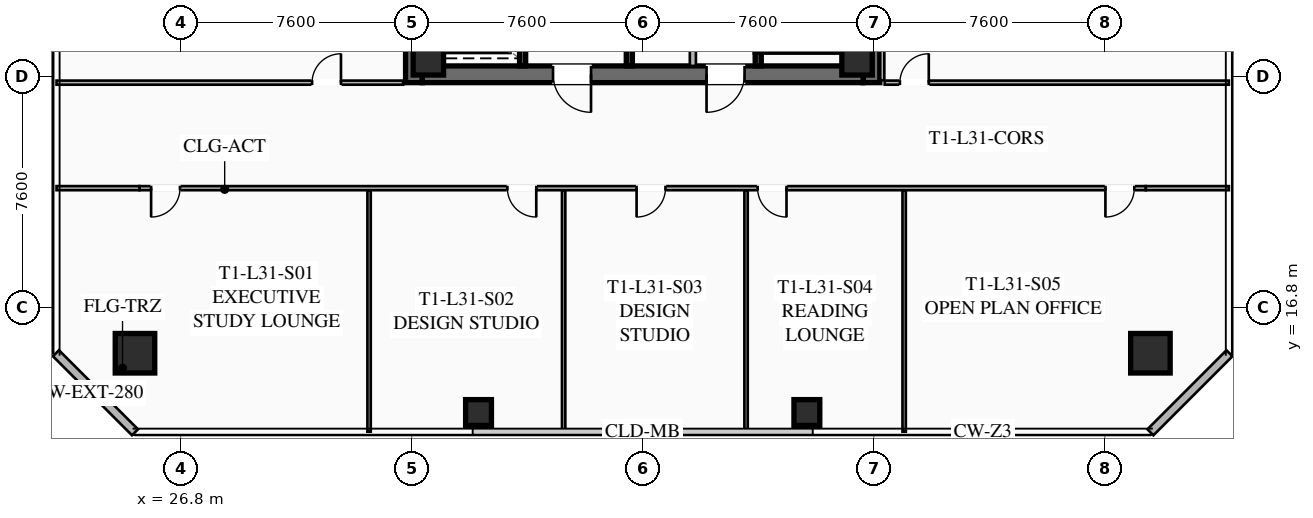
"""IFC4 building model, lengths in metres.
Left out: names, types, materials, properties, quantities, classifications, styles, units other than length and angle.
Written with IfcOpenShell. Run it as: python <this file> out.ifc"""

import sys

from ifc_helpers import new_model, si_unit, direction, frame, frame_2d, origin, origin_2d, place, context, subcontext, project, spatial, rectangle, hollow_rectangle, extrude, element, fill, save


model = new_model("IFC4")
c1 = context("Model", 3, precision=1e-05, world=origin(), true_north=direction((0.0, 1.0)))
c2 = subcontext(c1, "Body", "Model", "MODEL_VIEW")
j1 = project(units=[si_unit("LENGTHUNIT", "METRE"), si_unit("PLANEANGLEUNIT", "RADIAN")], contexts=[c1])
p1 = place(None, origin())
s1 = spatial("IfcSite", under=j1, at=p1, CompositionType="ELEMENT")
p2 = place(p1, origin())
s2 = spatial("IfcBuilding", under=s1, at=p2, CompositionType="ELEMENT")
p3 = place(p2, frame((0.0, 0.0, 117.95)))
s3 = spatial("IfcBuildingStorey", under=s2, at=p3, CompositionType="ELEMENT", Elevation=117.95)
for number, where, z_axis, x_axis in (
    (1, (34.475, 24.2, 0.0), (0.0, 0.0, 1.0), (0.0, 1.0, 0.0)),
    (2, (49.525, 39.8, 0.0), (0.0, 0.0, 1.0), (0.0, -1.0, 0.0)),
):
    element("IfcWall", number, at=place(p3, frame(where, z_axis=z_axis, x_axis=x_axis)), inside=s3, PredefinedType="SHEAR", context=c2, shape_type="SweptSolid", body=[
        extrude(rectangle(XDim=15.6, YDim=0.55, at=frame_2d((7.8, 0.0))), origin(), (0.0, 0.0, 1.0), 3.55),
    ])
p4 = place(p3, frame((49.25, 24.475, 0.0), z_axis=(0.0, 0.0, 1.0), x_axis=(-1.0, 0.0, 0.0)))
e3 = element("IfcWall", 3, at=p4, inside=s3, PredefinedType="SHEAR", context=c2, shape_type="SweptSolid", body=[
    extrude(rectangle(XDim=14.5, YDim=0.55, at=frame_2d((7.25, 0.0))), origin(), (0.0, 0.0, 1.0), 3.55),
])
p5 = place(p4, frame((8.95, 0.0, 0.0)))
e4 = element("IfcOpeningElement", 4, at=p5, cuts=e3, PredefinedType="OPENING", context=c2, shape_type="SweptSolid", body=[
    extrude(rectangle(XDim=1.25, YDim=2.25, at=frame_2d((0.625, 1.125))), frame((0.0, 0.285, 0.0), z_axis=(0.0, -1.0, 0.0), x_axis=(1.0, 0.0, 0.0)), (0.0, 0.0, 1.0), 0.57),
])
p6 = place(p4, frame((3.9, 0.0, 0.0)))
e5 = element("IfcOpeningElement", 5, at=p6, cuts=e3, PredefinedType="OPENING", context=c2, shape_type="SweptSolid", body=[
    extrude(rectangle(XDim=1.25, YDim=2.25, at=frame_2d((0.625, 1.125))), frame((0.0, 0.285, 0.0), z_axis=(0.0, -1.0, 0.0), x_axis=(1.0, 0.0, 0.0)), (0.0, 0.0, 1.0), 0.57),
])
for number, where, z_axis, x_axis in (
    (6, (34.95, 24.95, 0.0), (0.0, 0.0, 1.0), (1.0, 0.0, 0.0)),
    (7, (49.05, 24.95, 0.0), (0.0, 0.0, 1.0), (1.0, 0.0, 0.0)),
):
    element("IfcColumn", number, at=place(p3, frame(where, z_axis=z_axis, x_axis=x_axis)), inside=s3, PredefinedType="COLUMN", context=c2, shape_type="SweptSolid", body=[
        extrude(hollow_rectangle(XDim=1.0, YDim=1.0, WallThickness=0.04, at=origin_2d()), origin(), (0.0, 0.0, 1.0), 3.37),
    ])
for number, where, z_axis, x_axis in (
    (8, (25.3, 15.3, 0.0), (0.0, 0.0, 1.0), (1.0, 0.0, 0.0)),
    (9, (58.7, 15.3, 0.0), (0.0, 0.0, 1.0), (1.0, 0.0, 0.0)),
):
    element("IfcColumn", number, at=place(p3, frame(where, z_axis=z_axis, x_axis=x_axis)), inside=s3, PredefinedType="COLUMN", context=c2, shape_type="SweptSolid", body=[
        extrude(hollow_rectangle(XDim=1.3, YDim=1.3, WallThickness=0.05, at=origin_2d()), origin(), (0.0, 0.0, 1.0), 3.37),
    ])
for number, where, z_axis, x_axis in (
    (10, (36.6, 13.35, 0.0), (0.0, 0.0, 1.0), (1.0, 0.0, 0.0)),
    (11, (47.4, 13.35, 0.0), (0.0, 0.0, 1.0), (1.0, 0.0, 0.0)),
):
    element("IfcColumn", number, at=place(p3, frame(where, z_axis=z_axis, x_axis=x_axis)), inside=s3, PredefinedType="COLUMN", context=c2, shape_type="SweptSolid", body=[
        extrude(hollow_rectangle(XDim=0.85, YDim=0.85, WallThickness=0.035, at=origin_2d()), origin(), (0.0, 0.0, 1.0), 3.37),
    ])
for number, where, z_axis, x_axis in (
    (12, (25.3, 12.7, 0.0), (0.0, 0.0, 1.0), (-0.707, 0.707, 0.0)),
    (13, (61.3, 15.3, 0.0), (0.0, 0.0, 1.0), (-0.707, -0.707, 0.0)),
):
    element("IfcWall", number, at=place(p3, frame(where, z_axis=z_axis, x_axis=x_axis)), inside=s3, PredefinedType="SOLIDWALL", context=c2, shape_type="SweptSolid", body=[
        extrude(rectangle(XDim=3.677, YDim=0.28, at=frame_2d((1.838, 0.0))), origin(), (0.0, 0.0, 1.0), 3.37),
    ])
p7 = place(p3, frame((45.8, 32.8, 0.0), z_axis=(0.0, 0.0, 1.0), x_axis=(0.0, -1.0, 0.0)))
e14 = element("IfcWall", 14, at=p7, inside=s3, PredefinedType="SHEAR", context=c2, shape_type="SweptSolid", body=[
    extrude(rectangle(XDim=8.05, YDim=0.2, at=frame_2d((4.025, 0.0))), origin(), (0.0, 0.0, 1.0), 3.37),
])
p8 = place(p7, frame((0.45, 0.0, 0.0)))
e15 = element("IfcOpeningElement", 15, at=p8, cuts=e14, PredefinedType="OPENING", context=c2, shape_type="SweptSolid", body=[
    extrude(rectangle(XDim=1.15, YDim=2.2, at=frame_2d((0.575, 1.1))), frame((0.0, 0.11, 0.0), z_axis=(0.0, -1.0, 0.0), x_axis=(1.0, 0.0, 0.0)), (0.0, 0.0, 1.0), 0.22),
])
p9 = place(p3, frame((41.56, 24.75, 0.0), z_axis=(0.0, 0.0, 1.0), x_axis=(0.0, 1.0, 0.0)))
e16 = element("IfcWall", 16, at=p9, inside=s3, PredefinedType="SHEAR", context=c2, shape_type="SweptSolid", body=[
    extrude(rectangle(XDim=14.5, YDim=0.2, at=frame_2d((7.25, 0.0))), origin(), (0.0, 0.0, 1.0), 3.37),
])
p10 = place(p3, frame((38.05, 24.75, 0.0), z_axis=(0.0, 0.0, 1.0), x_axis=(0.0, 1.0, 0.0)))
e17 = element("IfcWall", 17, at=p10, inside=s3, PredefinedType="SHEAR", context=c2, shape_type="SweptSolid", body=[
    extrude(rectangle(XDim=6.45, YDim=0.2, at=frame_2d((3.225, 0.0))), origin(), (0.0, 0.0, 1.0), 3.37),
])
p11 = place(p10, frame((4.875, 0.0, 0.0)))
e18 = element("IfcOpeningElement", 18, at=p11, cuts=e17, PredefinedType="OPENING", context=c2, shape_type="SweptSolid", body=[
    extrude(rectangle(XDim=1.3, YDim=2.25, at=frame_2d((0.65, 1.125))), frame((0.0, 0.11, 0.0), z_axis=(0.0, -1.0, 0.0), x_axis=(1.0, 0.0, 0.0)), (0.0, 0.0, 1.0), 0.22),
])
p12 = place(p10, frame((2.875, 0.0, 0.0)))
e19 = element("IfcOpeningElement", 19, at=p12, cuts=e17, PredefinedType="OPENING", context=c2, shape_type="SweptSolid", body=[
    extrude(rectangle(XDim=1.3, YDim=2.25, at=frame_2d((0.65, 1.125))), frame((0.0, 0.11, 0.0), z_axis=(0.0, -1.0, 0.0), x_axis=(1.0, 0.0, 0.0)), (0.0, 0.0, 1.0), 0.22),
])
p13 = place(p10, frame((0.675, 0.0, 0.0)))
e20 = element("IfcOpeningElement", 20, at=p13, cuts=e17, PredefinedType="OPENING", context=c2, shape_type="SweptSolid", body=[
    extrude(rectangle(XDim=1.3, YDim=2.25, at=frame_2d((0.65, 1.125))), frame((0.0, 0.11, 0.0), z_axis=(0.0, -1.0, 0.0), x_axis=(1.0, 0.0, 0.0)), (0.0, 0.0, 1.0), 0.22),
])
p14 = place(p3, frame((43.65, 24.75, 0.0), z_axis=(0.0, 0.0, 1.0), x_axis=(0.0, 1.0, 0.0)))
e21 = element("IfcWall", 21, at=p14, inside=s3, PredefinedType="SOLIDWALL", context=c2, shape_type="SweptSolid", body=[
    extrude(rectangle(XDim=6.9, YDim=0.2, at=frame_2d((3.45, 0.0))), origin(), (0.0, 0.0, 1.0), 2.723),
])
p15 = place(p14, frame((0.85, 0.0, 0.0)))
e22 = element("IfcOpeningElement", 22, at=p15, cuts=e21, PredefinedType="OPENING", context=c2, shape_type="SweptSolid", body=[
    extrude(rectangle(XDim=0.95, YDim=2.05, at=frame_2d((0.475, 1.025))), frame((0.0, 0.11, 0.0), z_axis=(0.0, -1.0, 0.0), x_axis=(1.0, 0.0, 0.0)), (0.0, 0.0, 1.0), 0.22),
])
p16 = place(p14, frame((4.8, 0.0, 0.0)))
e23 = element("IfcOpeningElement", 23, at=p16, cuts=e21, PredefinedType="OPENING", context=c2, shape_type="SweptSolid", body=[
    extrude(rectangle(XDim=1.05, YDim=2.2, at=frame_2d((0.525, 1.1))), frame((0.0, 0.11, 0.0), z_axis=(0.0, -1.0, 0.0), x_axis=(1.0, 0.0, 0.0)), (0.0, 0.0, 1.0), 0.22),
])
p17 = place(p3, frame((58.55, 20.73, 0.0), z_axis=(0.0, 0.0, 1.0), x_axis=(-1.0, 0.0, 0.0)))
e24 = element("IfcWall", 24, at=p17, inside=s3, PredefinedType="PARTITIONING", context=c2, shape_type="SweptSolid", body=[
    extrude(rectangle(XDim=33.1, YDim=0.135, at=frame_2d((16.55, 0.0))), origin(), (0.0, 0.0, 1.0), 2.723),
])
p18 = place(p17, frame((31.77, 0.0, 0.0)))
e25 = element("IfcOpeningElement", 25, at=p18, cuts=e24, PredefinedType="OPENING", context=c2, shape_type="SweptSolid", body=[
    extrude(rectangle(XDim=0.95, YDim=2.05, at=frame_2d((0.475, 1.025))), frame((0.0, 0.077, 0.0), z_axis=(0.0, -1.0, 0.0), x_axis=(1.0, 0.0, 0.0)), (0.0, 0.0, 1.0), 0.155),
])
p19 = place(p17, frame((20.051, 0.0, 0.0)))
e26 = element("IfcOpeningElement", 26, at=p19, cuts=e24, PredefinedType="OPENING", context=c2, shape_type="SweptSolid", body=[
    extrude(rectangle(XDim=0.95, YDim=2.05, at=frame_2d((0.475, 1.025))), frame((0.0, 0.077, 0.0), z_axis=(0.0, -1.0, 0.0), x_axis=(1.0, 0.0, 0.0)), (0.0, 0.0, 1.0), 0.155),
])
p20 = place(p17, frame((15.801, 0.0, 0.0)))
e27 = element("IfcOpeningElement", 27, at=p20, cuts=e24, PredefinedType="OPENING", context=c2, shape_type="SweptSolid", body=[
    extrude(rectangle(XDim=0.95, YDim=2.05, at=frame_2d((0.475, 1.025))), frame((0.0, 0.077, 0.0), z_axis=(0.0, -1.0, 0.0), x_axis=(1.0, 0.0, 0.0)), (0.0, 0.0, 1.0), 0.155),
])
p21 = place(p17, frame((11.82, 0.0, 0.0)))
e28 = element("IfcOpeningElement", 28, at=p21, cuts=e24, PredefinedType="OPENING", context=c2, shape_type="SweptSolid", body=[
    extrude(rectangle(XDim=0.95, YDim=2.05, at=frame_2d((0.475, 1.025))), frame((0.0, 0.077, 0.0), z_axis=(0.0, -1.0, 0.0), x_axis=(1.0, 0.0, 0.0)), (0.0, 0.0, 1.0), 0.155),
])
p22 = place(p17, frame((0.38, 0.0, 0.0)))
e29 = element("IfcOpeningElement", 29, at=p22, cuts=e24, PredefinedType="OPENING", context=c2, shape_type="SweptSolid", body=[
    extrude(rectangle(XDim=0.95, YDim=2.05, at=frame_2d((0.475, 1.025))), frame((0.0, 0.077, 0.0), z_axis=(0.0, -1.0, 0.0), x_axis=(1.0, 0.0, 0.0)), (0.0, 0.0, 1.0), 0.155),
])
for number, where, z_axis, x_axis in (
    (30, (22.72, 20.73, 0.0), (0.0, 0.0, 1.0), (1.0, 0.0, 0.0)),
    (31, (58.55, 20.73, 0.0), (0.0, 0.0, 1.0), (1.0, 0.0, 0.0)),
):
    element("IfcWall", number, at=place(p3, frame(where, z_axis=z_axis, x_axis=x_axis)), inside=s3, PredefinedType="PARTITIONING", context=c2, shape_type="SweptSolid", body=[
        extrude(rectangle(XDim=2.73, YDim=0.135, at=frame_2d((1.365, 0.0))), origin(), (0.0, 0.0, 1.0), 2.723),
    ])
for number, where, z_axis, x_axis in (
    (32, (33.0, 12.72, 0.0), (0.0, 0.0, 1.0), (0.0, 1.0, 0.0)),
    (33, (39.4, 12.72, 0.0), (0.0, 0.0, 1.0), (0.0, 1.0, 0.0)),
    (34, (45.4, 12.72, 0.0), (0.0, 0.0, 1.0), (0.0, 1.0, 0.0)),
    (35, (50.6, 12.72, 0.0), (0.0, 0.0, 1.0), (0.0, 1.0, 0.0)),
):
    element("IfcWall", number, at=place(p3, frame(where, z_axis=z_axis, x_axis=x_axis)), inside=s3, PredefinedType="PARTITIONING", context=c2, shape_type="SweptSolid", body=[
        extrude(rectangle(XDim=7.93, YDim=0.11, at=frame_2d((3.965, 0.0))), origin(), (0.0, 0.0, 1.0), 2.723),
    ])
p23 = place(p3, frame((49.88, 39.72, 0.0), z_axis=(0.0, 0.0, 1.0), x_axis=(0.0, -1.0, 0.0)))
e36 = element("IfcWall", 36, at=p23, inside=s3, PredefinedType="PARTITIONING", context=c2, shape_type="SweptSolid", body=[
    extrude(rectangle(XDim=15.44, YDim=0.135, at=frame_2d((7.72, 0.0))), origin(), (0.0, 0.0, 1.0), 2.723),
])
p24 = place(p3, frame((49.96, 24.2, 0.0), z_axis=(0.0, 0.0, 1.0), x_axis=(1.0, 0.0, 0.0)))
e37 = element("IfcWall", 37, at=p24, inside=s3, PredefinedType="PARTITIONING", context=c2, shape_type="SweptSolid", body=[
    extrude(rectangle(XDim=11.32, YDim=0.135, at=frame_2d((5.66, 0.0))), origin(), (0.0, 0.0, 1.0), 2.723),
])
p25 = place(p24, frame((0.5, 0.0, 0.0)))
e38 = element("IfcOpeningElement", 38, at=p25, cuts=e37, PredefinedType="OPENING", context=c2, shape_type="SweptSolid", body=[
    extrude(rectangle(XDim=0.95, YDim=2.05, at=frame_2d((0.475, 1.025))), frame((0.0, 0.077, 0.0), z_axis=(0.0, -1.0, 0.0), x_axis=(1.0, 0.0, 0.0)), (0.0, 0.0, 1.0), 0.155),
])
p26 = place(p3, frame((22.72, 24.2, 0.0), z_axis=(0.0, 0.0, 1.0), x_axis=(1.0, 0.0, 0.0)))
e39 = element("IfcWall", 39, at=p26, inside=s3, PredefinedType="PARTITIONING", context=c2, shape_type="SweptSolid", body=[
    extrude(rectangle(XDim=11.4, YDim=0.135, at=frame_2d((5.7, 0.0))), origin(), (0.0, 0.0, 1.0), 2.723),
])
p27 = place(p26, frame((8.405, 0.0, 0.0)))
e40 = element("IfcOpeningElement", 40, at=p27, cuts=e39, PredefinedType="OPENING", context=c2, shape_type="SweptSolid", body=[
    extrude(rectangle(XDim=0.95, YDim=2.05, at=frame_2d((0.475, 1.025))), frame((0.0, 0.077, 0.0), z_axis=(0.0, -1.0, 0.0), x_axis=(1.0, 0.0, 0.0)), (0.0, 0.0, 1.0), 0.155),
])
p28 = place(p5, origin())
e41 = element("IfcDoor", 41, at=p28, inside=s3, OperationType="SINGLE_SWING_LEFT", PredefinedType="DOOR", context=c2, shape_type="SweptSolid", body=[
    extrude(rectangle(XDim=1.25, YDim=2.25, at=frame_2d((0.625, 1.125))), frame((0.0, 0.025, 0.0), z_axis=(0.0, -1.0, 0.0), x_axis=(1.0, 0.0, 0.0)), (0.0, 0.0, 1.0), 0.05),
])
fill(e4, e41)
p29 = place(p6, origin())
e42 = element("IfcDoor", 42, at=p29, inside=s3, OperationType="SINGLE_SWING_RIGHT", PredefinedType="DOOR", context=c2, shape_type="SweptSolid", body=[
    extrude(rectangle(XDim=1.25, YDim=2.25, at=frame_2d((0.625, 1.125))), frame((0.0, 0.025, 0.0), z_axis=(0.0, -1.0, 0.0), x_axis=(1.0, 0.0, 0.0)), (0.0, 0.0, 1.0), 0.05),
])
fill(e5, e42)
p30 = place(p18, origin())
e43 = element("IfcDoor", 43, at=p30, inside=s3, OperationType="SINGLE_SWING_RIGHT", PredefinedType="DOOR", context=c2, shape_type="SweptSolid", body=[
    extrude(rectangle(XDim=0.95, YDim=2.05, at=frame_2d((0.475, 1.025))), frame((0.0, 0.025, 0.0), z_axis=(0.0, -1.0, 0.0), x_axis=(1.0, 0.0, 0.0)), (0.0, 0.0, 1.0), 0.05),
])
fill(e25, e43)
p31 = place(p19, origin())
e44 = element("IfcDoor", 44, at=p31, inside=s3, OperationType="SINGLE_SWING_LEFT", PredefinedType="DOOR", context=c2, shape_type="SweptSolid", body=[
    extrude(rectangle(XDim=0.95, YDim=2.05, at=frame_2d((0.475, 1.025))), frame((0.0, 0.025, 0.0), z_axis=(0.0, -1.0, 0.0), x_axis=(1.0, 0.0, 0.0)), (0.0, 0.0, 1.0), 0.05),
])
fill(e26, e44)
p32 = place(p20, origin())
e45 = element("IfcDoor", 45, at=p32, inside=s3, OperationType="SINGLE_SWING_RIGHT", PredefinedType="DOOR", context=c2, shape_type="SweptSolid", body=[
    extrude(rectangle(XDim=0.95, YDim=2.05, at=frame_2d((0.475, 1.025))), frame((0.0, 0.025, 0.0), z_axis=(0.0, -1.0, 0.0), x_axis=(1.0, 0.0, 0.0)), (0.0, 0.0, 1.0), 0.05),
])
fill(e27, e45)
p33 = place(p21, origin())
e46 = element("IfcDoor", 46, at=p33, inside=s3, OperationType="SINGLE_SWING_LEFT", PredefinedType="DOOR", context=c2, shape_type="SweptSolid", body=[
    extrude(rectangle(XDim=0.95, YDim=2.05, at=frame_2d((0.475, 1.025))), frame((0.0, 0.025, 0.0), z_axis=(0.0, -1.0, 0.0), x_axis=(1.0, 0.0, 0.0)), (0.0, 0.0, 1.0), 0.05),
])
fill(e28, e46)
p34 = place(p22, origin())
e47 = element("IfcDoor", 47, at=p34, inside=s3, OperationType="SINGLE_SWING_RIGHT", PredefinedType="DOOR", context=c2, shape_type="SweptSolid", body=[
    extrude(rectangle(XDim=0.95, YDim=2.05, at=frame_2d((0.475, 1.025))), frame((0.0, 0.025, 0.0), z_axis=(0.0, -1.0, 0.0), x_axis=(1.0, 0.0, 0.0)), (0.0, 0.0, 1.0), 0.05),
])
fill(e29, e47)
p35 = place(p25, origin())
e48 = element("IfcDoor", 48, at=p35, inside=s3, OperationType="SINGLE_SWING_RIGHT", PredefinedType="DOOR", context=c2, shape_type="SweptSolid", body=[
    extrude(rectangle(XDim=0.95, YDim=2.05, at=frame_2d((0.475, 1.025))), frame((0.0, 0.025, 0.0), z_axis=(0.0, -1.0, 0.0), x_axis=(1.0, 0.0, 0.0)), (0.0, 0.0, 1.0), 0.05),
])
fill(e38, e48)
p36 = place(p27, origin())
e49 = element("IfcDoor", 49, at=p36, inside=s3, OperationType="SINGLE_SWING_RIGHT", PredefinedType="DOOR", context=c2, shape_type="SweptSolid", body=[
    extrude(rectangle(XDim=0.95, YDim=2.05, at=frame_2d((0.475, 1.025))), frame((0.0, 0.025, 0.0), z_axis=(0.0, -1.0, 0.0), x_axis=(1.0, 0.0, 0.0)), (0.0, 0.0, 1.0), 0.05),
])
fill(e40, e49)
save(model, sys.argv[1])
